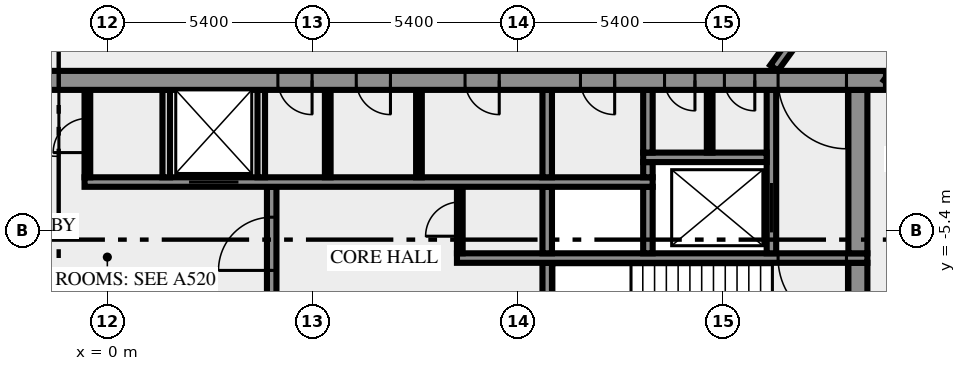
"""IFC4 building model, lengths in metres.
Left out: names, types, materials, properties, quantities, classifications, styles, units other than length and angle.
Written with IfcOpenShell. Run it as: python <this file> out.ifc"""

import sys

from ifc_helpers import new_model, si_unit, direction, frame, frame_2d, origin, place, context, subcontext, project, spatial, rectangle, extrude, element, fill, save


model = new_model("IFC4")
c1 = context("Model", 3, precision=1e-05, world=origin(), true_north=direction((0.0, 1.0)))
c2 = subcontext(c1, "Body", "Model", "MODEL_VIEW")
j1 = project(units=[si_unit("LENGTHUNIT", "METRE"), si_unit("PLANEANGLEUNIT", "RADIAN")], contexts=[c1])
p1 = place(None, origin())
s1 = spatial("IfcSite", under=j1, at=p1, CompositionType="ELEMENT")
p2 = place(p1, origin())
s2 = spatial("IfcBuilding", under=s1, at=p2, CompositionType="ELEMENT")
p3 = place(p2, frame((0.0, 0.0, 319.0)))
s3 = spatial("IfcBuildingStorey", under=s2, at=p3, CompositionType="ELEMENT", Elevation=319.0)
p4 = place(p3, frame((19.75, -10.5, 0.0), z_axis=(0.0, 0.0, 1.0), x_axis=(0.0, 1.0, 0.0)))
e1 = element("IfcWall", 1, at=p4, inside=s3, PredefinedType="SHEAR", context=c2, shape_type="SweptSolid", body=[
    extrude(rectangle(XDim=4.25, YDim=0.5, at=frame_2d((2.125, 0.0))), origin(), (0.0, 0.0, 1.0), 3.65),
])
p5 = place(p3, frame((4.325, -7.25, 0.0), z_axis=(0.0, 0.0, 1.0), x_axis=(0.0, 1.0, 0.0)))
e2 = element("IfcWall", 2, at=p5, inside=s3, PredefinedType="SHEAR", context=c2, shape_type="SweptSolid", body=[
    extrude(rectangle(XDim=3.0, YDim=0.25, at=frame_2d((1.5, 0.0))), origin(), (0.0, 0.0, 1.0), 3.65),
])
p6 = place(p5, frame((0.8, 0.0, 0.0)))
e3 = element("IfcOpeningElement", 3, at=p6, cuts=e2, PredefinedType="OPENING", context=c2, shape_type="SweptSolid", body=[
    extrude(rectangle(XDim=1.4, YDim=2.1, at=frame_2d((0.7, 1.05))), frame((0.0, 0.135, 0.0), z_axis=(0.0, -1.0, 0.0), x_axis=(1.0, 0.0, 0.0)), (0.0, 0.0, 1.0), 0.27),
])
p7 = place(p3, frame((11.575, -7.25, 0.0), z_axis=(0.0, 0.0, 1.0), x_axis=(0.0, 1.0, 0.0)))
e4 = element("IfcWall", 4, at=p7, inside=s3, PredefinedType="SHEAR", context=c2, shape_type="SweptSolid", body=[
    extrude(rectangle(XDim=1.0, YDim=0.25, at=frame_2d((0.5, 0.0))), origin(), (0.0, 0.0, 1.0), 3.65),
])
p8 = place(p3, frame((20.0, -6.125, 0.0), z_axis=(0.0, 0.0, 1.0), x_axis=(-1.0, 0.0, 0.0)))
e5 = element("IfcWall", 5, at=p8, inside=s3, PredefinedType="SHEAR", context=c2, shape_type="SweptSolid", body=[
    extrude(rectangle(XDim=10.8, YDim=0.25, at=frame_2d((5.4, 0.0))), origin(), (0.0, 0.0, 1.0), 3.65),
])
p9 = place(p8, frame((0.55, 0.0, 0.0)))
e6 = element("IfcOpeningElement", 6, at=p9, cuts=e5, PredefinedType="OPENING", context=c2, shape_type="SweptSolid", body=[
    extrude(rectangle(XDim=1.8, YDim=2.1, at=frame_2d((0.9, 1.05))), frame((0.0, 0.135, 0.0), z_axis=(0.0, -1.0, 0.0), x_axis=(1.0, 0.0, 0.0)), (0.0, 0.0, 1.0), 0.27),
])
p10 = place(p3, frame((9.275, -6.0, 0.0), z_axis=(0.0, 0.0, 1.0), x_axis=(0.0, 1.0, 0.0)))
e7 = element("IfcWall", 7, at=p10, inside=s3, PredefinedType="PARTITIONING", context=c2, shape_type="SweptSolid", body=[
    extrude(rectangle(XDim=1.75, YDim=0.15, at=frame_2d((0.875, 0.0))), origin(), (0.0, 0.0, 1.0), 3.65),
])
p11 = place(p10, frame((0.45, 0.0, 0.0)))
e8 = element("IfcOpeningElement", 8, at=p11, cuts=e7, PredefinedType="OPENING", context=c2, shape_type="SweptSolid", body=[
    extrude(rectangle(XDim=0.9, YDim=2.1, at=frame_2d((0.45, 1.05))), frame((0.0, 0.085, 0.0), z_axis=(0.0, -1.0, 0.0), x_axis=(1.0, 0.0, 0.0)), (0.0, 0.0, 1.0), 0.17),
])
for number, where, z_axis, x_axis in (
    (9, (11.575, -6.0, 0.0), (0.0, 0.0, 1.0), (0.0, 1.0, 0.0)),
    (10, (14.225, -6.0, 0.0), (0.0, 0.0, 1.0), (0.0, 1.0, 0.0)),
):
    element("IfcWall", number, at=place(p3, frame(where, z_axis=z_axis, x_axis=x_axis)), inside=s3, PredefinedType="SHEAR", context=c2, shape_type="SweptSolid", body=[
        extrude(rectangle(XDim=1.75, YDim=0.25, at=frame_2d((0.875, 0.0))), origin(), (0.0, 0.0, 1.0), 3.65),
    ])
p12 = place(p3, frame((17.475, -6.0, 0.0), z_axis=(0.0, 0.0, 1.0), x_axis=(0.0, 1.0, 0.0)))
e11 = element("IfcWall", 11, at=p12, inside=s3, PredefinedType="SHEAR", context=c2, shape_type="SweptSolid", body=[
    extrude(rectangle(XDim=4.3, YDim=0.25, at=frame_2d((2.15, 0.0))), origin(), (0.0, 0.0, 1.0), 3.65),
])
p13 = place(p12, frame((0.55, 0.0, 0.0)))
e12 = element("IfcOpeningElement", 12, at=p13, cuts=e11, PredefinedType="OPENING", context=c2, shape_type="SweptSolid", body=[
    extrude(rectangle(XDim=1.3, YDim=2.1, at=frame_2d((0.65, 1.05))), frame((0.0, 0.135, 0.0), z_axis=(0.0, -1.0, 0.0), x_axis=(1.0, 0.0, 0.0)), (0.0, 0.0, 1.0), 0.27),
])
p14 = place(p3, frame((19.75, -6.0, 0.0), z_axis=(0.0, 0.0, 1.0), x_axis=(0.0, 1.0, 0.0)))
e13 = element("IfcWall", 13, at=p14, inside=s3, PredefinedType="SHEAR", context=c2, shape_type="SweptSolid", body=[
    extrude(rectangle(XDim=4.3, YDim=0.5, at=frame_2d((2.15, 0.0))), origin(), (0.0, 0.0, 1.0), 3.65),
])
p15 = place(p3, frame((-0.6, -4.125, 0.0), z_axis=(0.0, 0.0, 1.0), x_axis=(1.0, 0.0, 0.0)))
e14 = element("IfcWall", 14, at=p15, inside=s3, PredefinedType="SHEAR", context=c2, shape_type="SweptSolid", body=[
    extrude(rectangle(XDim=14.95, YDim=0.25, at=frame_2d((7.475, 0.0))), origin(), (0.0, 0.0, 1.0), 3.65),
])
p16 = place(p15, frame((2.75, 0.0, 0.0)))
e15 = element("IfcOpeningElement", 15, at=p16, cuts=e14, PredefinedType="OPENING", context=c2, shape_type="SweptSolid", body=[
    extrude(rectangle(XDim=1.3, YDim=2.1, at=frame_2d((0.65, 1.05))), frame((0.0, 0.135, 0.0), z_axis=(0.0, -1.0, 0.0), x_axis=(1.0, 0.0, 0.0)), (0.0, 0.0, 1.0), 0.27),
])
p17 = place(p3, frame((-0.525, -4.0, 0.0), z_axis=(0.0, 0.0, 1.0), x_axis=(0.0, 1.0, 0.0)))
e16 = element("IfcWall", 16, at=p17, inside=s3, PredefinedType="PARTITIONING", context=c2, shape_type="SweptSolid", body=[
    extrude(rectangle(XDim=2.3, YDim=0.15, at=frame_2d((1.15, 0.0))), origin(), (0.0, 0.0, 1.0), 3.65),
])
p18 = place(p17, frame((0.65, 0.0, 0.0)))
e17 = element("IfcOpeningElement", 17, at=p18, cuts=e16, PredefinedType="OPENING", context=c2, shape_type="SweptSolid", body=[
    extrude(rectangle(XDim=0.9, YDim=2.1, at=frame_2d((0.45, 1.05))), frame((0.0, 0.085, 0.0), z_axis=(0.0, -1.0, 0.0), x_axis=(1.0, 0.0, 0.0)), (0.0, 0.0, 1.0), 0.17),
])
for number, where, z_axis, x_axis in (
    (18, (1.55, -4.0, 0.0), (0.0, 0.0, 1.0), (0.0, 1.0, 0.0)),
    (19, (4.05, -4.0, 0.0), (0.0, 0.0, 1.0), (0.0, 1.0, 0.0)),
):
    element("IfcWall", number, at=place(p3, frame(where, z_axis=z_axis, x_axis=x_axis)), inside=s3, PredefinedType="SOLIDWALL", context=c2, shape_type="SweptSolid", body=[
        extrude(rectangle(XDim=2.3, YDim=0.2, at=frame_2d((1.15, 0.0))), origin(), (0.0, 0.0, 1.0), 3.65),
    ])
for number, where, z_axis, x_axis in (
    (20, (5.8, -4.0, 0.0), (0.0, 0.0, 1.0), (0.0, 1.0, 0.0)),
    (21, (8.2, -4.0, 0.0), (0.0, 0.0, 1.0), (0.0, 1.0, 0.0)),
):
    element("IfcWall", number, at=place(p3, frame(where, z_axis=z_axis, x_axis=x_axis)), inside=s3, PredefinedType="PARTITIONING", context=c2, shape_type="SweptSolid", body=[
        extrude(rectangle(XDim=2.3, YDim=0.15, at=frame_2d((1.15, 0.0))), origin(), (0.0, 0.0, 1.0), 3.65),
    ])
p19 = place(p3, frame((11.575, -4.0, 0.0), z_axis=(0.0, 0.0, 1.0), x_axis=(0.0, 1.0, 0.0)))
e22 = element("IfcWall", 22, at=p19, inside=s3, PredefinedType="SHEAR", context=c2, shape_type="SweptSolid", body=[
    extrude(rectangle(XDim=2.3, YDim=0.25, at=frame_2d((1.15, 0.0))), origin(), (0.0, 0.0, 1.0), 3.65),
])
p20 = place(p3, frame((14.225, -4.0, 0.0), z_axis=(0.0, 0.0, 1.0), x_axis=(0.0, 1.0, 0.0)))
e23 = element("IfcWall", 23, at=p20, inside=s3, PredefinedType="SHEAR", context=c2, shape_type="SweptSolid", body=[
    extrude(rectangle(XDim=0.4, YDim=0.25, at=frame_2d((0.2, 0.0))), origin(), (0.0, 0.0, 1.0), 3.65),
])
p21 = place(p3, frame((14.1, -3.475, 0.0), z_axis=(0.0, 0.0, 1.0), x_axis=(1.0, 0.0, 0.0)))
e24 = element("IfcWall", 24, at=p21, inside=s3, PredefinedType="SHEAR", context=c2, shape_type="SweptSolid", body=[
    extrude(rectangle(XDim=3.25, YDim=0.25, at=frame_2d((1.625, 0.0))), origin(), (0.0, 0.0, 1.0), 3.65),
])
p22 = place(p3, frame((14.225, -3.35, 0.0), z_axis=(0.0, 0.0, 1.0), x_axis=(0.0, 1.0, 0.0)))
e25 = element("IfcWall", 25, at=p22, inside=s3, PredefinedType="SHEAR", context=c2, shape_type="SweptSolid", body=[
    extrude(rectangle(XDim=1.65, YDim=0.25, at=frame_2d((0.825, 0.0))), origin(), (0.0, 0.0, 1.0), 3.65),
])
p23 = place(p3, frame((15.85, -3.35, 0.0), z_axis=(0.0, 0.0, 1.0), x_axis=(0.0, 1.0, 0.0)))
e26 = element("IfcWall", 26, at=p23, inside=s3, PredefinedType="PARTITIONING", context=c2, shape_type="SweptSolid", body=[
    extrude(rectangle(XDim=1.65, YDim=0.15, at=frame_2d((0.825, 0.0))), origin(), (0.0, 0.0, 1.0), 3.65),
])
p24 = place(p3, frame((20.49, -1.45, 0.0), z_axis=(0.0, 0.0, 1.0), x_axis=(-1.0, 0.0, 0.0)))
e27 = element("IfcWall", 27, at=p24, inside=s3, PredefinedType="SHEAR", context=c2, shape_type="SweptSolid", body=[
    extrude(rectangle(XDim=40.98, YDim=0.5, at=frame_2d((20.49, 0.0))), origin(), (0.0, 0.0, 1.0), 3.65),
])
p25 = place(p24, frame((38.14, 0.0, 0.0)))
e28 = element("IfcOpeningElement", 28, at=p25, cuts=e27, PredefinedType="OPENING", context=c2, shape_type="SweptSolid", body=[
    extrude(rectangle(XDim=1.8, YDim=2.1, at=frame_2d((0.9, 1.05))), frame((0.0, 0.26, 0.0), z_axis=(0.0, -1.0, 0.0), x_axis=(1.0, 0.0, 0.0)), (0.0, 0.0, 1.0), 0.52),
])
p26 = place(p24, frame((35.89, 0.0, 0.0)))
e29 = element("IfcOpeningElement", 29, at=p26, cuts=e27, PredefinedType="OPENING", context=c2, shape_type="SweptSolid", body=[
    extrude(rectangle(XDim=0.9, YDim=2.1, at=frame_2d((0.45, 1.05))), frame((0.0, 0.26, 0.0), z_axis=(0.0, -1.0, 0.0), x_axis=(1.0, 0.0, 0.0)), (0.0, 0.0, 1.0), 0.52),
])
p27 = place(p24, frame((32.94, 0.0, 0.0)))
e30 = element("IfcOpeningElement", 30, at=p27, cuts=e27, PredefinedType="OPENING", context=c2, shape_type="SweptSolid", body=[
    extrude(rectangle(XDim=0.9, YDim=2.1, at=frame_2d((0.45, 1.05))), frame((0.0, 0.26, 0.0), z_axis=(0.0, -1.0, 0.0), x_axis=(1.0, 0.0, 0.0)), (0.0, 0.0, 1.0), 0.52),
])
p28 = place(p24, frame((31.015, 0.0, 0.0)))
e31 = element("IfcOpeningElement", 31, at=p28, cuts=e27, PredefinedType="OPENING", context=c2, shape_type="SweptSolid", body=[
    extrude(rectangle(XDim=0.8, YDim=2.1, at=frame_2d((0.4, 1.05))), frame((0.0, 0.26, 0.0), z_axis=(0.0, -1.0, 0.0), x_axis=(1.0, 0.0, 0.0)), (0.0, 0.0, 1.0), 0.52),
])
p29 = place(p24, frame((24.765, 0.0, 0.0)))
e32 = element("IfcOpeningElement", 32, at=p29, cuts=e27, PredefinedType="OPENING", context=c2, shape_type="SweptSolid", body=[
    extrude(rectangle(XDim=0.8, YDim=2.1, at=frame_2d((0.4, 1.05))), frame((0.0, 0.26, 0.0), z_axis=(0.0, -1.0, 0.0), x_axis=(1.0, 0.0, 0.0)), (0.0, 0.0, 1.0), 0.52),
])
p30 = place(p24, frame((21.765, 0.0, 0.0)))
e33 = element("IfcOpeningElement", 33, at=p30, cuts=e27, PredefinedType="OPENING", context=c2, shape_type="SweptSolid", body=[
    extrude(rectangle(XDim=2.0, YDim=2.1, at=frame_2d((1.0, 1.05))), frame((0.0, 0.26, 0.0), z_axis=(0.0, -1.0, 0.0), x_axis=(1.0, 0.0, 0.0)), (0.0, 0.0, 1.0), 0.52),
])
p31 = place(p24, frame((15.103, 0.0, 0.0)))
e34 = element("IfcOpeningElement", 34, at=p31, cuts=e27, PredefinedType="OPENING", context=c2, shape_type="SweptSolid", body=[
    extrude(rectangle(XDim=0.9, YDim=2.1, at=frame_2d((0.45, 1.05))), frame((0.0, 0.26, 0.0), z_axis=(0.0, -1.0, 0.0), x_axis=(1.0, 0.0, 0.0)), (0.0, 0.0, 1.0), 0.52),
])
p32 = place(p24, frame((13.04, 0.0, 0.0)))
e35 = element("IfcOpeningElement", 35, at=p32, cuts=e27, PredefinedType="OPENING", context=c2, shape_type="SweptSolid", body=[
    extrude(rectangle(XDim=0.9, YDim=2.1, at=frame_2d((0.45, 1.05))), frame((0.0, 0.26, 0.0), z_axis=(0.0, -1.0, 0.0), x_axis=(1.0, 0.0, 0.0)), (0.0, 0.0, 1.0), 0.52),
])
p33 = place(p24, frame((10.177, 0.0, 0.0)))
e36 = element("IfcOpeningElement", 36, at=p33, cuts=e27, PredefinedType="OPENING", context=c2, shape_type="SweptSolid", body=[
    extrude(rectangle(XDim=0.9, YDim=2.1, at=frame_2d((0.45, 1.05))), frame((0.0, 0.26, 0.0), z_axis=(0.0, -1.0, 0.0), x_axis=(1.0, 0.0, 0.0)), (0.0, 0.0, 1.0), 0.52),
])
p34 = place(p24, frame((7.14, 0.0, 0.0)))
e37 = element("IfcOpeningElement", 37, at=p34, cuts=e27, PredefinedType="OPENING", context=c2, shape_type="SweptSolid", body=[
    extrude(rectangle(XDim=0.9, YDim=2.1, at=frame_2d((0.45, 1.05))), frame((0.0, 0.26, 0.0), z_axis=(0.0, -1.0, 0.0), x_axis=(1.0, 0.0, 0.0)), (0.0, 0.0, 1.0), 0.52),
])
p35 = place(p24, frame((5.028, 0.0, 0.0)))
e38 = element("IfcOpeningElement", 38, at=p35, cuts=e27, PredefinedType="OPENING", context=c2, shape_type="SweptSolid", body=[
    extrude(rectangle(XDim=0.8, YDim=2.1, at=frame_2d((0.4, 1.05))), frame((0.0, 0.26, 0.0), z_axis=(0.0, -1.0, 0.0), x_axis=(1.0, 0.0, 0.0)), (0.0, 0.0, 1.0), 0.52),
])
p36 = place(p24, frame((3.452, 0.0, 0.0)))
e39 = element("IfcOpeningElement", 39, at=p36, cuts=e27, PredefinedType="OPENING", context=c2, shape_type="SweptSolid", body=[
    extrude(rectangle(XDim=0.8, YDim=2.1, at=frame_2d((0.4, 1.05))), frame((0.0, 0.26, 0.0), z_axis=(0.0, -1.0, 0.0), x_axis=(1.0, 0.0, 0.0)), (0.0, 0.0, 1.0), 0.52),
])
p37 = place(p24, frame((1.04, 0.0, 0.0)))
e40 = element("IfcOpeningElement", 40, at=p37, cuts=e27, PredefinedType="OPENING", context=c2, shape_type="SweptSolid", body=[
    extrude(rectangle(XDim=1.8, YDim=2.1, at=frame_2d((0.9, 1.05))), frame((0.0, 0.26, 0.0), z_axis=(0.0, -1.0, 0.0), x_axis=(1.0, 0.0, 0.0)), (0.0, 0.0, 1.0), 0.52),
])
p38 = place(p3, frame((17.545, -1.125, 0.0), z_axis=(0.0, 0.0, 1.0), x_axis=(0.58779555165, 0.809009511354, 0.0)))
e41 = element("IfcWall", 41, at=p38, inside=s3, PredefinedType="SOLIDWALL", context=c2, shape_type="SweptSolid", body=[
    extrude(rectangle(XDim=18.103, YDim=0.25, at=frame_2d((9.052, 0.0))), origin(), (0.0, 0.0, 1.0), 3.65),
])
p39 = place(p38, frame((3.441, 0.0, 0.0)))
e42 = element("IfcOpeningElement", 42, at=p39, cuts=e41, PredefinedType="OPENING", context=c2, shape_type="SweptSolid", body=[
    extrude(rectangle(XDim=0.9, YDim=2.1, at=frame_2d((0.45, 1.05))), frame((0.0, 0.135, 0.0), z_axis=(0.0, -1.0, 0.0), x_axis=(1.0, 0.0, 0.0)), (0.0, 0.0, 1.0), 0.27),
])
p40 = place(p3, frame((30.183, 11.761, 0.0), z_axis=(0.0, 0.0, 1.0), x_axis=(-0.587781762867, -0.80901952958, 0.0)))
e43 = element("IfcWall", 43, at=p40, inside=s3, PredefinedType="SOLIDWALL", context=c2, shape_type="SweptSolid", body=[
    extrude(rectangle(XDim=16.42, YDim=0.25, at=frame_2d((8.21, 0.0))), origin(), (0.0, 0.0, 1.0), 3.65),
])
p41 = place(p40, frame((0.225, 0.0, 0.0)))
e44 = element("IfcOpeningElement", 44, at=p41, cuts=e43, PredefinedType="OPENING", context=c2, shape_type="SweptSolid", body=[
    extrude(rectangle(XDim=0.9, YDim=2.1, at=frame_2d((0.45, 1.05))), frame((0.0, 0.135, 0.0), z_axis=(0.0, -1.0, 0.0), x_axis=(1.0, 0.0, 0.0)), (0.0, 0.0, 1.0), 0.27),
])
p42 = place(p40, frame((6.605, 0.0, 0.0)))
e45 = element("IfcOpeningElement", 45, at=p42, cuts=e43, PredefinedType="OPENING", context=c2, shape_type="SweptSolid", body=[
    extrude(rectangle(XDim=0.9, YDim=2.1, at=frame_2d((0.45, 1.05))), frame((0.0, 0.135, 0.0), z_axis=(0.0, -1.0, 0.0), x_axis=(1.0, 0.0, 0.0)), (0.0, 0.0, 1.0), 0.27),
])
p43 = place(p6, origin())
e46 = element("IfcDoor", 46, at=p43, inside=s3, OperationType="DOUBLE_DOOR_SINGLE_SWING", PredefinedType="DOOR", context=c2, shape_type="SweptSolid", body=[
    extrude(rectangle(XDim=1.4, YDim=2.1, at=frame_2d((0.7, 1.05))), frame((0.0, 0.025, 0.0), z_axis=(0.0, -1.0, 0.0), x_axis=(1.0, 0.0, 0.0)), (0.0, 0.0, 1.0), 0.05),
])
fill(e3, e46)
p44 = place(p9, origin())
e47 = element("IfcDoor", 47, at=p44, inside=s3, OperationType="DOUBLE_DOOR_SINGLE_SWING", PredefinedType="DOOR", context=c2, shape_type="SweptSolid", body=[
    extrude(rectangle(XDim=1.8, YDim=2.1, at=frame_2d((0.9, 1.05))), frame((0.0, 0.025, 0.0), z_axis=(0.0, -1.0, 0.0), x_axis=(1.0, 0.0, 0.0)), (0.0, 0.0, 1.0), 0.05),
])
fill(e6, e47)
p45 = place(p11, origin())
e48 = element("IfcDoor", 48, at=p45, inside=s3, OperationType="SINGLE_SWING_RIGHT", PredefinedType="DOOR", context=c2, shape_type="SweptSolid", body=[
    extrude(rectangle(XDim=0.9, YDim=2.1, at=frame_2d((0.45, 1.05))), frame((0.0, 0.025, 0.0), z_axis=(0.0, -1.0, 0.0), x_axis=(1.0, 0.0, 0.0)), (0.0, 0.0, 1.0), 0.05),
])
fill(e8, e48)
p46 = place(p13, origin())
e49 = element("IfcDoor", 49, at=p46, inside=s3, OperationType="DOUBLE_DOOR_SLIDING", PredefinedType="DOOR", context=c2, shape_type="SweptSolid", body=[
    extrude(rectangle(XDim=1.3, YDim=2.1, at=frame_2d((0.65, 1.05))), frame((0.0, 0.025, 0.0), z_axis=(0.0, -1.0, 0.0), x_axis=(1.0, 0.0, 0.0)), (0.0, 0.0, 1.0), 0.05),
])
fill(e12, e49)
p47 = place(p16, origin())
e50 = element("IfcDoor", 50, at=p47, inside=s3, OperationType="DOUBLE_DOOR_SLIDING", PredefinedType="DOOR", context=c2, shape_type="SweptSolid", body=[
    extrude(rectangle(XDim=1.3, YDim=2.1, at=frame_2d((0.65, 1.05))), frame((0.0, 0.025, 0.0), z_axis=(0.0, -1.0, 0.0), x_axis=(1.0, 0.0, 0.0)), (0.0, 0.0, 1.0), 0.05),
])
fill(e15, e50)
p48 = place(p18, origin())
e51 = element("IfcDoor", 51, at=p48, inside=s3, OperationType="SINGLE_SWING_LEFT", PredefinedType="DOOR", context=c2, shape_type="SweptSolid", body=[
    extrude(rectangle(XDim=0.9, YDim=2.1, at=frame_2d((0.45, 1.05))), frame((0.0, 0.025, 0.0), z_axis=(0.0, -1.0, 0.0), x_axis=(1.0, 0.0, 0.0)), (0.0, 0.0, 1.0), 0.05),
])
fill(e17, e51)
p49 = place(p30, origin())
e52 = element("IfcDoor", 52, at=p49, inside=s3, OperationType="DOUBLE_DOOR_SINGLE_SWING", PredefinedType="DOOR", context=c2, shape_type="SweptSolid", body=[
    extrude(rectangle(XDim=2.0, YDim=2.1, at=frame_2d((1.0, 1.05))), frame((0.0, 0.025, 0.0), z_axis=(0.0, -1.0, 0.0), x_axis=(1.0, 0.0, 0.0)), (0.0, 0.0, 1.0), 0.05),
])
fill(e33, e52)
p50 = place(p31, origin())
e53 = element("IfcDoor", 53, at=p50, inside=s3, OperationType="SINGLE_SWING_LEFT", PredefinedType="DOOR", context=c2, shape_type="SweptSolid", body=[
    extrude(rectangle(XDim=0.9, YDim=2.1, at=frame_2d((0.45, 1.05))), frame((0.0, 0.025, 0.0), z_axis=(0.0, -1.0, 0.0), x_axis=(1.0, 0.0, 0.0)), (0.0, 0.0, 1.0), 0.05),
])
fill(e34, e53)
p51 = place(p32, origin())
e54 = element("IfcDoor", 54, at=p51, inside=s3, OperationType="SINGLE_SWING_LEFT", PredefinedType="DOOR", context=c2, shape_type="SweptSolid", body=[
    extrude(rectangle(XDim=0.9, YDim=2.1, at=frame_2d((0.45, 1.05))), frame((0.0, 0.025, 0.0), z_axis=(0.0, -1.0, 0.0), x_axis=(1.0, 0.0, 0.0)), (0.0, 0.0, 1.0), 0.05),
])
fill(e35, e54)
p52 = place(p33, origin())
e55 = element("IfcDoor", 55, at=p52, inside=s3, OperationType="SINGLE_SWING_LEFT", PredefinedType="DOOR", context=c2, shape_type="SweptSolid", body=[
    extrude(rectangle(XDim=0.9, YDim=2.1, at=frame_2d((0.45, 1.05))), frame((0.0, 0.025, 0.0), z_axis=(0.0, -1.0, 0.0), x_axis=(1.0, 0.0, 0.0)), (0.0, 0.0, 1.0), 0.05),
])
fill(e36, e55)
p53 = place(p34, origin())
e56 = element("IfcDoor", 56, at=p53, inside=s3, OperationType="SINGLE_SWING_LEFT", PredefinedType="DOOR", context=c2, shape_type="SweptSolid", body=[
    extrude(rectangle(XDim=0.9, YDim=2.1, at=frame_2d((0.45, 1.05))), frame((0.0, 0.025, 0.0), z_axis=(0.0, -1.0, 0.0), x_axis=(1.0, 0.0, 0.0)), (0.0, 0.0, 1.0), 0.05),
])
fill(e37, e56)
p54 = place(p35, origin())
e57 = element("IfcDoor", 57, at=p54, inside=s3, OperationType="SINGLE_SWING_LEFT", PredefinedType="DOOR", context=c2, shape_type="SweptSolid", body=[
    extrude(rectangle(XDim=0.8, YDim=2.1, at=frame_2d((0.4, 1.05))), frame((0.0, 0.025, 0.0), z_axis=(0.0, -1.0, 0.0), x_axis=(1.0, 0.0, 0.0)), (0.0, 0.0, 1.0), 0.05),
])
fill(e38, e57)
p55 = place(p36, origin())
e58 = element("IfcDoor", 58, at=p55, inside=s3, OperationType="SINGLE_SWING_LEFT", PredefinedType="DOOR", context=c2, shape_type="SweptSolid", body=[
    extrude(rectangle(XDim=0.8, YDim=2.1, at=frame_2d((0.4, 1.05))), frame((0.0, 0.025, 0.0), z_axis=(0.0, -1.0, 0.0), x_axis=(1.0, 0.0, 0.0)), (0.0, 0.0, 1.0), 0.05),
])
fill(e39, e58)
p56 = place(p37, origin())
e59 = element("IfcDoor", 59, at=p56, inside=s3, OperationType="DOUBLE_DOOR_SINGLE_SWING", PredefinedType="DOOR", context=c2, shape_type="SweptSolid", body=[
    extrude(rectangle(XDim=1.8, YDim=2.1, at=frame_2d((0.9, 1.05))), frame((0.0, 0.025, 0.0), z_axis=(0.0, -1.0, 0.0), x_axis=(1.0, 0.0, 0.0)), (0.0, 0.0, 1.0), 0.05),
])
fill(e40, e59)
save(model, sys.argv[1])
